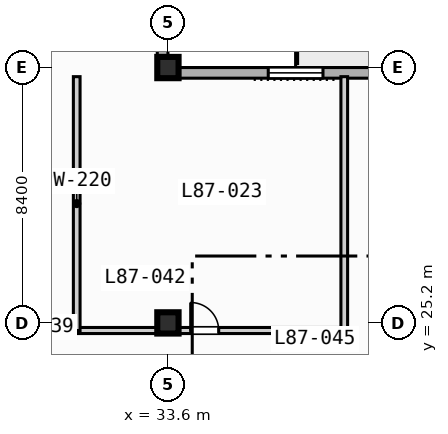
"""IFC4 building model, lengths in metres.
Left out: names, types, materials, properties, quantities, classifications, styles, units other than length and angle.
Written with IfcOpenShell. Run it as: python <this file> out.ifc"""

import sys

from ifc_helpers import new_model, si_unit, direction, frame, frame_2d, origin, origin_2d, place, context, subcontext, project, spatial, rectangle, extrude, element, fill, save


model = new_model("IFC4")
c1 = context("Model", 3, precision=1e-05, world=origin(), true_north=direction((0.0, 1.0)))
c2 = subcontext(c1, "Body", "Model", "MODEL_VIEW")
j1 = project(units=[si_unit("LENGTHUNIT", "METRE"), si_unit("PLANEANGLEUNIT", "RADIAN")], contexts=[c1])
p1 = place(None, origin())
s1 = spatial("IfcSite", under=j1, at=p1, CompositionType="ELEMENT")
p2 = place(p1, origin())
s2 = spatial("IfcBuilding", under=s1, at=p2, CompositionType="ELEMENT")
p3 = place(p2, frame((0.0, 0.0, 351.5)))
s3 = spatial("IfcBuildingStorey", under=s2, at=p3, CompositionType="ELEMENT", Elevation=351.5)
for number, where, z_axis, x_axis in (
    (1, (33.6, 25.2, 0.0), (0.0, 0.0, 1.0), (1.0, 0.0, 0.0)),
    (2, (33.6, 33.6, 0.0), (0.0, 0.0, 1.0), (1.0, 0.0, 0.0)),
):
    element("IfcColumn", number, at=place(p3, frame(where, z_axis=z_axis, x_axis=x_axis)), inside=s3, PredefinedType="COLUMN", context=c2, shape_type="SweptSolid", body=[
        extrude(rectangle(XDim=0.7, YDim=0.7, at=origin_2d()), origin(), (0.0, 0.0, 1.0), 3.9),
    ])
p4 = place(p3, frame((33.425, 72.425, 0.0), z_axis=(0.0, 0.0, 1.0), x_axis=(0.0, -1.0, 0.0)))
e3 = element("IfcWall", 3, at=p4, inside=s3, PredefinedType="STANDARD", context=c2, shape_type="SweptSolid", body=[
    extrude(rectangle(XDim=39.0, YDim=0.35, at=frame_2d((19.5, 0.0))), origin(), (0.0, 0.0, 1.0), 3.67),
])
p5 = place(p4, frame((5.9, 0.0, 0.85)))
e4 = element("IfcOpeningElement", 4, at=p5, cuts=e3, PredefinedType="OPENING", context=c2, shape_type="SweptSolid", body=[
    extrude(rectangle(XDim=1.8, YDim=1.8, at=frame_2d((0.9, 0.9))), frame((0.0, 0.185, 0.0), z_axis=(0.0, -1.0, 0.0), x_axis=(1.0, 0.0, 0.0)), (0.0, 0.0, 1.0), 0.37),
])
p6 = place(p3, frame((33.425, 33.425, 0.0), z_axis=(0.0, 0.0, 1.0), x_axis=(1.0, 0.0, 0.0)))
e5 = element("IfcWall", 5, at=p6, inside=s3, PredefinedType="STANDARD", context=c2, shape_type="SweptSolid", body=[
    extrude(rectangle(XDim=30.6, YDim=0.35, at=frame_2d((15.3, 0.0))), origin(), (0.0, 0.0, 1.0), 3.67),
])
p7 = place(p6, frame((12.075, 0.0, 0.0)))
e6 = element("IfcOpeningElement", 6, at=p7, cuts=e5, PredefinedType="OPENING", context=c2, shape_type="SweptSolid", body=[
    extrude(rectangle(XDim=1.4, YDim=2.2, at=frame_2d((0.7, 1.1))), frame((0.0, 0.185, 0.0), z_axis=(0.0, -1.0, 0.0), x_axis=(1.0, 0.0, 0.0)), (0.0, 0.0, 1.0), 0.37),
])
p8 = place(p6, frame((3.475, 0.0, 0.85)))
e7 = element("IfcOpeningElement", 7, at=p8, cuts=e5, PredefinedType="OPENING", context=c2, shape_type="SweptSolid", body=[
    extrude(rectangle(XDim=1.8, YDim=1.8, at=frame_2d((0.9, 0.9))), frame((0.0, 0.185, 0.0), z_axis=(0.0, -1.0, 0.0), x_axis=(1.0, 0.0, 0.0)), (0.0, 0.0, 1.0), 0.37),
])
p9 = place(p3, frame((30.6, 24.95, 0.0), z_axis=(0.0, 0.0, 1.0), x_axis=(1.0, 0.0, 0.0)))
e8 = element("IfcWall", 8, at=p9, inside=s3, PredefinedType="PARTITIONING", context=c2, shape_type="SweptSolid", body=[
    extrude(rectangle(XDim=8.8, YDim=0.2, at=frame_2d((4.4, 0.0))), origin(), (0.0, 0.0, 1.0), 3.07),
])
p10 = place(p9, frame((3.75, 0.0, 0.0)))
e9 = element("IfcOpeningElement", 9, at=p10, cuts=e8, PredefinedType="OPENING", context=c2, shape_type="SweptSolid", body=[
    extrude(rectangle(XDim=0.92, YDim=2.1, at=frame_2d((0.46, 1.05))), frame((0.0, 0.11, 0.0), z_axis=(0.0, -1.0, 0.0), x_axis=(1.0, 0.0, 0.0)), (0.0, 0.0, 1.0), 0.22),
])
for number, where, z_axis, x_axis in (
    (10, (30.6, 24.95, 0.0), (0.0, 0.0, 1.0), (0.0, 1.0, 0.0)),
    (11, (39.4, 24.95, 0.0), (0.0, 0.0, 1.0), (0.0, 1.0, 0.0)),
):
    element("IfcWall", number, at=place(p3, frame(where, z_axis=z_axis, x_axis=x_axis)), inside=s3, PredefinedType="PARTITIONING", context=c2, shape_type="SweptSolid", body=[
        extrude(rectangle(XDim=8.35, YDim=0.22, at=frame_2d((4.175, 0.0))), origin(), (0.0, 0.0, 1.0), 3.67),
    ])
p11 = place(p8, origin())
e12 = element("IfcWindow", 12, at=p11, inside=s3, PartitioningType="SINGLE_PANEL", PredefinedType="WINDOW", context=c2, shape_type="SweptSolid", body=[
    extrude(rectangle(XDim=1.8, YDim=1.8, at=frame_2d((0.9, 0.9))), frame((0.0, 0.03, 0.0), z_axis=(0.0, -1.0, 0.0), x_axis=(1.0, 0.0, 0.0)), (0.0, 0.0, 1.0), 0.06),
])
fill(e7, e12)
p12 = place(p10, origin())
e13 = element("IfcDoor", 13, at=p12, inside=s3, OperationType="SINGLE_SWING_LEFT", PredefinedType="DOOR", context=c2, shape_type="SweptSolid", body=[
    extrude(rectangle(XDim=0.92, YDim=2.1, at=frame_2d((0.46, 1.05))), frame((0.0, 0.025, 0.0), z_axis=(0.0, -1.0, 0.0), x_axis=(1.0, 0.0, 0.0)), (0.0, 0.0, 1.0), 0.05),
])
fill(e9, e13)
save(model, sys.argv[1])
